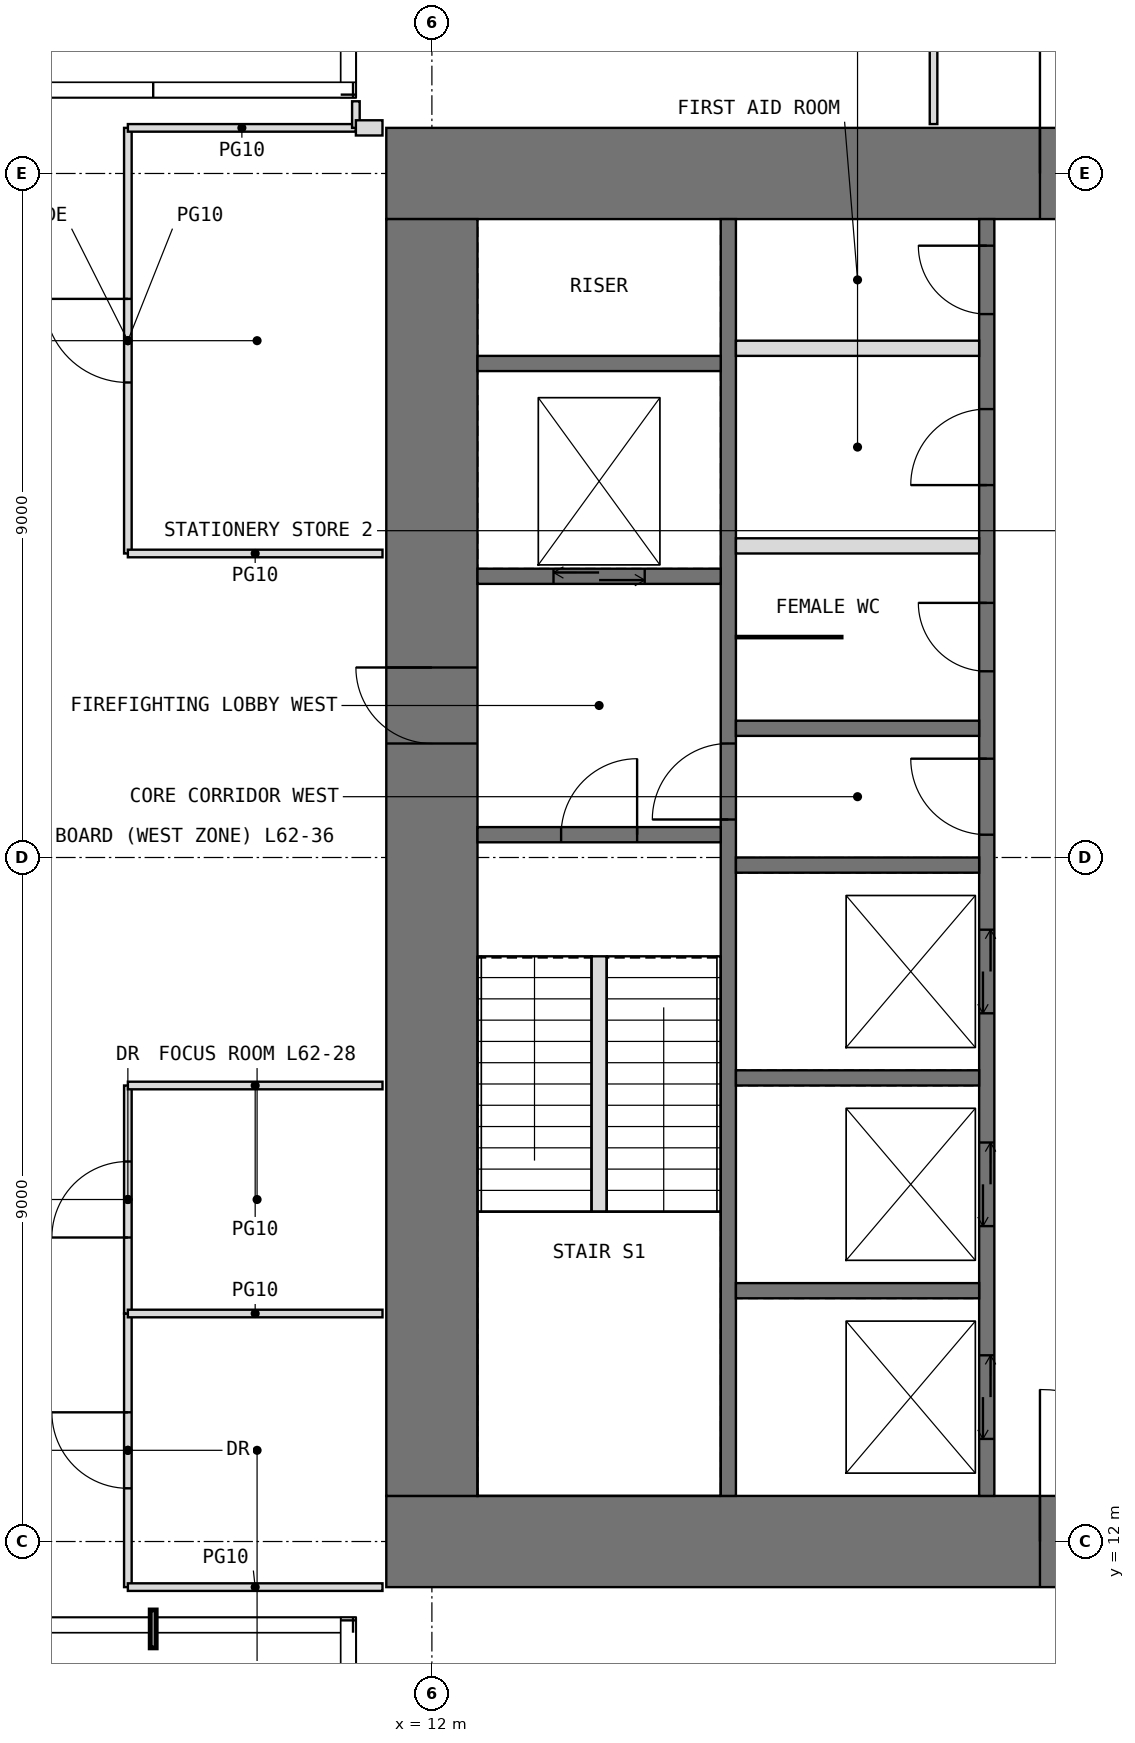
"""IFC4 building model, lengths in metres.
Left out: names, types, materials, properties, quantities, classifications, styles, units other than length and angle.
Written with IfcOpenShell. Run it as: python <this file> out.ifc"""

import sys

from ifc_helpers import new_model, si_unit, direction, frame, frame_2d, origin, place, context, subcontext, project, spatial, rectangle, extrude, element, fill, save


model = new_model("IFC4")
c1 = context("Model", 3, precision=1e-05, world=origin(), true_north=direction((0.0, 1.0)))
c2 = subcontext(c1, "Body", "Model", "MODEL_VIEW")
j1 = project(units=[si_unit("LENGTHUNIT", "METRE"), si_unit("PLANEANGLEUNIT", "RADIAN")], contexts=[c1])
p1 = place(None, origin())
s1 = spatial("IfcSite", under=j1, at=p1, CompositionType="ELEMENT")
p2 = place(p1, origin())
s2 = spatial("IfcBuilding", under=s1, at=p2, CompositionType="ELEMENT")
p3 = place(p2, frame((0.0, 0.0, 260.8)))
s3 = spatial("IfcBuildingStorey", under=s2, at=p3, CompositionType="ELEMENT", Elevation=260.8)
p4 = place(p3, frame((11.4, 12.0, -0.05), z_axis=(0.0, 0.0, 1.0), x_axis=(1.0, 0.0, 0.0)))
e1 = element("IfcWall", 1, at=p4, inside=s3, PredefinedType="SHEAR", context=c2, shape_type="SweptSolid", body=[
    extrude(rectangle(XDim=19.2, YDim=1.2, at=frame_2d((9.6, 0.0))), origin(), (0.0, 0.0, 1.0), 4.2),
])
p5 = place(p4, frame((8.6, 0.0, 0.05)))
e2 = element("IfcOpeningElement", 2, at=p5, cuts=e1, PredefinedType="OPENING", context=c2, shape_type="SweptSolid", body=[
    extrude(rectangle(XDim=2.0, YDim=2.2, at=frame_2d((1.0, 1.1))), frame((0.0, 0.61, 0.0), z_axis=(0.0, -1.0, 0.0), x_axis=(1.0, 0.0, 0.0)), (0.0, 0.0, 1.0), 1.22),
])
p6 = place(p3, frame((11.4, 30.0, -0.05), z_axis=(0.0, 0.0, 1.0), x_axis=(1.0, 0.0, 0.0)))
e3 = element("IfcWall", 3, at=p6, inside=s3, PredefinedType="SHEAR", context=c2, shape_type="SweptSolid", body=[
    extrude(rectangle(XDim=19.2, YDim=1.2, at=frame_2d((9.6, 0.0))), origin(), (0.0, 0.0, 1.0), 4.2),
])
p7 = place(p6, frame((8.6, 0.0, 0.05)))
e4 = element("IfcOpeningElement", 4, at=p7, cuts=e3, PredefinedType="OPENING", context=c2, shape_type="SweptSolid", body=[
    extrude(rectangle(XDim=2.0, YDim=2.2, at=frame_2d((1.0, 1.1))), frame((0.0, 0.61, 0.0), z_axis=(0.0, -1.0, 0.0), x_axis=(1.0, 0.0, 0.0)), (0.0, 0.0, 1.0), 1.22),
])
p8 = place(p3, frame((12.0, 12.6, -0.05), z_axis=(0.0, 0.0, 1.0), x_axis=(0.0, 1.0, 0.0)))
e5 = element("IfcWall", 5, at=p8, inside=s3, PredefinedType="SHEAR", context=c2, shape_type="SweptSolid", body=[
    extrude(rectangle(XDim=16.8, YDim=1.2, at=frame_2d((8.4, 0.0))), origin(), (0.0, 0.0, 1.0), 4.2),
])
p9 = place(p8, frame((9.9, 0.0, 0.05)))
e6 = element("IfcOpeningElement", 6, at=p9, cuts=e5, PredefinedType="OPENING", context=c2, shape_type="SweptSolid", body=[
    extrude(rectangle(XDim=1.0, YDim=2.2, at=frame_2d((0.5, 1.1))), frame((0.0, 0.61, 0.0), z_axis=(0.0, -1.0, 0.0), x_axis=(1.0, 0.0, 0.0)), (0.0, 0.0, 1.0), 1.22),
])
p10 = place(p3, frame((15.9, 12.6, -0.05), z_axis=(0.0, 0.0, 1.0), x_axis=(0.0, 1.0, 0.0)))
e7 = element("IfcWall", 7, at=p10, inside=s3, PredefinedType="SHEAR", context=c2, shape_type="SweptSolid", body=[
    extrude(rectangle(XDim=16.8, YDim=0.2, at=frame_2d((8.4, 0.0))), origin(), (0.0, 0.0, 1.0), 4.2),
])
p11 = place(p10, frame((8.9, 0.0, 0.05)))
e8 = element("IfcOpeningElement", 8, at=p11, cuts=e7, PredefinedType="OPENING", context=c2, shape_type="SweptSolid", body=[
    extrude(rectangle(XDim=1.0, YDim=2.2, at=frame_2d((0.5, 1.1))), frame((0.0, 0.11, 0.0), z_axis=(0.0, -1.0, 0.0), x_axis=(1.0, 0.0, 0.0)), (0.0, 0.0, 1.0), 0.22),
])
p12 = place(p3, frame((19.3, 12.6, -0.05), z_axis=(0.0, 0.0, 1.0), x_axis=(0.0, 1.0, 0.0)))
e9 = element("IfcWall", 9, at=p12, inside=s3, PredefinedType="SHEAR", context=c2, shape_type="SweptSolid", body=[
    extrude(rectangle(XDim=16.8, YDim=0.2, at=frame_2d((8.4, 0.0))), origin(), (0.0, 0.0, 1.0), 4.2),
])
p13 = place(p12, frame((8.7, 0.0, 0.05)))
e10 = element("IfcOpeningElement", 10, at=p13, cuts=e9, PredefinedType="OPENING", context=c2, shape_type="SweptSolid", body=[
    extrude(rectangle(XDim=1.0, YDim=2.2, at=frame_2d((0.5, 1.1))), frame((0.0, 0.11, 0.0), z_axis=(0.0, -1.0, 0.0), x_axis=(1.0, 0.0, 0.0)), (0.0, 0.0, 1.0), 0.22),
])
p14 = place(p12, frame((10.85, 0.0, 0.05)))
e11 = element("IfcOpeningElement", 11, at=p14, cuts=e9, PredefinedType="OPENING", context=c2, shape_type="SweptSolid", body=[
    extrude(rectangle(XDim=0.9, YDim=2.2, at=frame_2d((0.45, 1.1))), frame((0.0, 0.11, 0.0), z_axis=(0.0, -1.0, 0.0), x_axis=(1.0, 0.0, 0.0)), (0.0, 0.0, 1.0), 0.22),
])
p15 = place(p12, frame((13.3, 0.0, 0.05)))
e12 = element("IfcOpeningElement", 12, at=p15, cuts=e9, PredefinedType="OPENING", context=c2, shape_type="SweptSolid", body=[
    extrude(rectangle(XDim=1.0, YDim=2.2, at=frame_2d((0.5, 1.1))), frame((0.0, 0.11, 0.0), z_axis=(0.0, -1.0, 0.0), x_axis=(1.0, 0.0, 0.0)), (0.0, 0.0, 1.0), 0.22),
])
p16 = place(p12, frame((15.55, 0.0, 0.05)))
e13 = element("IfcOpeningElement", 13, at=p16, cuts=e9, PredefinedType="OPENING", context=c2, shape_type="SweptSolid", body=[
    extrude(rectangle(XDim=0.9, YDim=2.2, at=frame_2d((0.45, 1.1))), frame((0.0, 0.11, 0.0), z_axis=(0.0, -1.0, 0.0), x_axis=(1.0, 0.0, 0.0)), (0.0, 0.0, 1.0), 0.22),
])
p17 = place(p12, frame((0.75, 0.0, 0.05)))
e14 = element("IfcOpeningElement", 14, at=p17, cuts=e9, PredefinedType="OPENING", context=c2, shape_type="SweptSolid", body=[
    extrude(rectangle(XDim=1.1, YDim=2.2, at=frame_2d((0.55, 1.1))), frame((0.0, 0.11, 0.0), z_axis=(0.0, -1.0, 0.0), x_axis=(1.0, 0.0, 0.0)), (0.0, 0.0, 1.0), 0.22),
])
p18 = place(p12, frame((3.55, 0.0, 0.05)))
e15 = element("IfcOpeningElement", 15, at=p18, cuts=e9, PredefinedType="OPENING", context=c2, shape_type="SweptSolid", body=[
    extrude(rectangle(XDim=1.1, YDim=2.2, at=frame_2d((0.55, 1.1))), frame((0.0, 0.11, 0.0), z_axis=(0.0, -1.0, 0.0), x_axis=(1.0, 0.0, 0.0)), (0.0, 0.0, 1.0), 0.22),
])
p19 = place(p12, frame((6.35, 0.0, 0.05)))
e16 = element("IfcOpeningElement", 16, at=p19, cuts=e9, PredefinedType="OPENING", context=c2, shape_type="SweptSolid", body=[
    extrude(rectangle(XDim=1.1, YDim=2.2, at=frame_2d((0.55, 1.1))), frame((0.0, 0.11, 0.0), z_axis=(0.0, -1.0, 0.0), x_axis=(1.0, 0.0, 0.0)), (0.0, 0.0, 1.0), 0.22),
])
p20 = place(p3, frame((12.6, 21.3, -0.05), z_axis=(0.0, 0.0, 1.0), x_axis=(1.0, 0.0, 0.0)))
e17 = element("IfcWall", 17, at=p20, inside=s3, PredefinedType="SHEAR", context=c2, shape_type="SweptSolid", body=[
    extrude(rectangle(XDim=3.2, YDim=0.2, at=frame_2d((1.6, 0.0))), origin(), (0.0, 0.0, 1.0), 4.2),
])
p21 = place(p20, frame((1.1, 0.0, 0.05)))
e18 = element("IfcOpeningElement", 18, at=p21, cuts=e17, PredefinedType="OPENING", context=c2, shape_type="SweptSolid", body=[
    extrude(rectangle(XDim=1.0, YDim=2.2, at=frame_2d((0.5, 1.1))), frame((0.0, 0.11, 0.0), z_axis=(0.0, -1.0, 0.0), x_axis=(1.0, 0.0, 0.0)), (0.0, 0.0, 1.0), 0.22),
])
p22 = place(p3, frame((12.6, 24.7, -0.05), z_axis=(0.0, 0.0, 1.0), x_axis=(1.0, 0.0, 0.0)))
e19 = element("IfcWall", 19, at=p22, inside=s3, PredefinedType="SHEAR", context=c2, shape_type="SweptSolid", body=[
    extrude(rectangle(XDim=3.2, YDim=0.2, at=frame_2d((1.6, 0.0))), origin(), (0.0, 0.0, 1.0), 4.2),
])
p23 = place(p22, frame((1.0, 0.0, 0.05)))
e20 = element("IfcOpeningElement", 20, at=p23, cuts=e19, PredefinedType="OPENING", context=c2, shape_type="SweptSolid", body=[
    extrude(rectangle(XDim=1.2, YDim=2.2, at=frame_2d((0.6, 1.1))), frame((0.0, 0.11, 0.0), z_axis=(0.0, -1.0, 0.0), x_axis=(1.0, 0.0, 0.0)), (0.0, 0.0, 1.0), 0.22),
])
for number, where, z_axis, x_axis in (
    (21, (12.6, 27.5, -0.05), (0.0, 0.0, 1.0), (1.0, 0.0, 0.0)),
    (22, (16.0, 15.3, -0.05), (0.0, 0.0, 1.0), (1.0, 0.0, 0.0)),
    (23, (16.0, 18.1, -0.05), (0.0, 0.0, 1.0), (1.0, 0.0, 0.0)),
    (24, (16.0, 20.9, -0.05), (0.0, 0.0, 1.0), (1.0, 0.0, 0.0)),
    (25, (16.0, 22.7, -0.05), (0.0, 0.0, 1.0), (1.0, 0.0, 0.0)),
):
    element("IfcWall", number, at=place(p3, frame(where, z_axis=z_axis, x_axis=x_axis)), inside=s3, PredefinedType="SHEAR", context=c2, shape_type="SweptSolid", body=[
        extrude(rectangle(XDim=3.2, YDim=0.2, at=frame_2d((1.6, 0.0))), origin(), (0.0, 0.0, 1.0), 4.2),
    ])
for number, where, z_axis, x_axis in (
    (26, (16.0, 25.1, 0.0), (0.0, 0.0, 1.0), (1.0, 0.0, 0.0)),
    (27, (16.0, 27.7, 0.0), (0.0, 0.0, 1.0), (1.0, 0.0, 0.0)),
):
    element("IfcWall", number, at=place(p3, frame(where, z_axis=z_axis, x_axis=x_axis)), inside=s3, PredefinedType="PARTITIONING", context=c2, shape_type="SweptSolid", body=[
        extrude(rectangle(XDim=3.2, YDim=0.2, at=frame_2d((1.6, 0.0))), origin(), (0.0, 0.0, 1.0), 3.95),
    ])
p24 = place(p3, frame((16.0, 23.9, 0.0), z_axis=(0.0, 0.0, 1.0), x_axis=(1.0, 0.0, 0.0)))
e28 = element("IfcWall", 28, at=p24, inside=s3, PredefinedType="PARTITIONING", context=c2, shape_type="SweptSolid", body=[
    extrude(rectangle(XDim=1.4, YDim=0.03, at=frame_2d((0.7, 0.0))), origin(), (0.0, 0.0, 1.0), 3.95),
])
p25 = place(p3, frame((8.0, 11.4, 0.0), z_axis=(0.0, 0.0, 1.0), x_axis=(0.0, 1.0, 0.0)))
e29 = element("IfcWall", 29, at=p25, inside=s3, PredefinedType="PARTITIONING", context=c2, shape_type="SweptSolid", body=[
    extrude(rectangle(XDim=3.6, YDim=0.1, at=frame_2d((1.8, 0.0))), origin(), (0.0, 0.0, 1.0), 3.95),
])
p26 = place(p25, frame((1.3, 0.0, 0.0)))
e30 = element("IfcOpeningElement", 30, at=p26, cuts=e29, PredefinedType="OPENING", context=c2, shape_type="SweptSolid", body=[
    extrude(rectangle(XDim=1.0, YDim=2.2, at=frame_2d((0.5, 1.1))), frame((0.0, 0.06, 0.0), z_axis=(0.0, -1.0, 0.0), x_axis=(1.0, 0.0, 0.0)), (0.0, 0.0, 1.0), 0.12),
])
p27 = place(p3, frame((8.0, 11.4, 0.0), z_axis=(0.0, 0.0, 1.0), x_axis=(1.0, 0.0, 0.0)))
e31 = element("IfcWall", 31, at=p27, inside=s3, PredefinedType="PARTITIONING", context=c2, shape_type="SweptSolid", body=[
    extrude(rectangle(XDim=3.35, YDim=0.1, at=frame_2d((1.675, 0.0))), origin(), (0.0, 0.0, 1.0), 3.95),
])
p28 = place(p3, frame((8.0, 15.0, 0.0), z_axis=(0.0, 0.0, 1.0), x_axis=(0.0, 1.0, 0.0)))
e32 = element("IfcWall", 32, at=p28, inside=s3, PredefinedType="PARTITIONING", context=c2, shape_type="SweptSolid", body=[
    extrude(rectangle(XDim=3.0, YDim=0.1, at=frame_2d((1.5, 0.0))), origin(), (0.0, 0.0, 1.0), 3.95),
])
p29 = place(p28, frame((1.0, 0.0, 0.0)))
e33 = element("IfcOpeningElement", 33, at=p29, cuts=e32, PredefinedType="OPENING", context=c2, shape_type="SweptSolid", body=[
    extrude(rectangle(XDim=1.0, YDim=2.2, at=frame_2d((0.5, 1.1))), frame((0.0, 0.06, 0.0), z_axis=(0.0, -1.0, 0.0), x_axis=(1.0, 0.0, 0.0)), (0.0, 0.0, 1.0), 0.12),
])
for number, where, z_axis, x_axis in (
    (34, (8.0, 15.0, 0.0), (0.0, 0.0, 1.0), (1.0, 0.0, 0.0)),
    (35, (8.0, 18.0, 0.0), (0.0, 0.0, 1.0), (1.0, 0.0, 0.0)),
):
    element("IfcWall", number, at=place(p3, frame(where, z_axis=z_axis, x_axis=x_axis)), inside=s3, PredefinedType="PARTITIONING", context=c2, shape_type="SweptSolid", body=[
        extrude(rectangle(XDim=3.35, YDim=0.1, at=frame_2d((1.675, 0.0))), origin(), (0.0, 0.0, 1.0), 3.95),
    ])
p30 = place(p3, frame((8.0, 25.0, 0.0), z_axis=(0.0, 0.0, 1.0), x_axis=(0.0, 1.0, 0.0)))
e36 = element("IfcWall", 36, at=p30, inside=s3, PredefinedType="PARTITIONING", context=c2, shape_type="SweptSolid", body=[
    extrude(rectangle(XDim=5.6, YDim=0.1, at=frame_2d((2.8, 0.0))), origin(), (0.0, 0.0, 1.0), 3.95),
])
p31 = place(p30, frame((2.25, 0.0, 0.0)))
e37 = element("IfcOpeningElement", 37, at=p31, cuts=e36, PredefinedType="OPENING", context=c2, shape_type="SweptSolid", body=[
    extrude(rectangle(XDim=1.1, YDim=2.3, at=frame_2d((0.55, 1.15))), frame((0.0, 0.06, 0.0), z_axis=(0.0, -1.0, 0.0), x_axis=(1.0, 0.0, 0.0)), (0.0, 0.0, 1.0), 0.12),
])
p32 = place(p3, frame((8.0, 25.0, 0.0), z_axis=(0.0, 0.0, 1.0), x_axis=(1.0, 0.0, 0.0)))
e38 = element("IfcWall", 38, at=p32, inside=s3, PredefinedType="PARTITIONING", context=c2, shape_type="SweptSolid", body=[
    extrude(rectangle(XDim=3.35, YDim=0.1, at=frame_2d((1.675, 0.0))), origin(), (0.0, 0.0, 1.0), 3.95),
])
p33 = place(p3, frame((8.0, 30.6, 0.0), z_axis=(0.0, 0.0, 1.0), x_axis=(1.0, 0.0, 0.0)))
e39 = element("IfcWall", 39, at=p33, inside=s3, PredefinedType="PARTITIONING", context=c2, shape_type="SweptSolid", body=[
    extrude(rectangle(XDim=3.0, YDim=0.1, at=frame_2d((1.5, 0.0))), origin(), (0.0, 0.0, 1.0), 3.95),
])
p34 = place(p3, frame((11.0, 30.6, 0.0), z_axis=(0.0, 0.0, 1.0), x_axis=(0.0, 1.0, 0.0)))
e40 = element("IfcWall", 40, at=p34, inside=s3, PredefinedType="PARTITIONING", context=c2, shape_type="SweptSolid", body=[
    extrude(rectangle(XDim=0.35, YDim=0.1, at=frame_2d((0.175, 0.0))), origin(), (0.0, 0.0, 1.0), 3.95),
])
p35 = place(p3, frame((11.0, 30.6, 0.0), z_axis=(0.0, 0.0, 1.0), x_axis=(1.0, 0.0, 0.0)))
e41 = element("IfcWall", 41, at=p35, inside=s3, PredefinedType="PARTITIONING", context=c2, shape_type="SweptSolid", body=[
    extrude(rectangle(XDim=0.35, YDim=0.2, at=frame_2d((0.175, 0.0))), origin(), (0.0, 0.0, 1.0), 3.95),
])
p36 = place(p3, frame((18.6, 30.65, 0.0), z_axis=(0.0, 0.0, 1.0), x_axis=(0.0, 1.0, 0.0)))
e42 = element("IfcWall", 42, at=p36, inside=s3, PredefinedType="PARTITIONING", context=c2, shape_type="SweptSolid", body=[
    extrude(rectangle(XDim=4.15, YDim=0.1, at=frame_2d((2.075, 0.0))), origin(), (0.0, 0.0, 1.0), 3.95),
])
p37 = place(p3, frame((14.2, 16.34, 0.0), z_axis=(0.0, 0.0, 1.0), x_axis=(0.0, 1.0, 0.0)))
e43 = element("IfcWall", 43, at=p37, inside=s3, PredefinedType="PARTITIONING", context=c2, shape_type="SweptSolid", body=[
    extrude(rectangle(XDim=3.36, YDim=0.2, at=frame_2d((1.68, 0.0))), origin(), (0.0, 0.0, 1.0), 4.2),
])
p38 = place(p5, origin())
e44 = element("IfcDoor", 44, at=p38, inside=s3, OperationType="DOUBLE_DOOR_SINGLE_SWING", PredefinedType="DOOR", context=c2, shape_type="SweptSolid", body=[
    extrude(rectangle(XDim=2.0, YDim=2.2, at=frame_2d((1.0, 1.1))), frame((0.0, 0.025, 0.0), z_axis=(0.0, -1.0, 0.0), x_axis=(1.0, 0.0, 0.0)), (0.0, 0.0, 1.0), 0.05),
])
fill(e2, e44)
p39 = place(p7, origin())
e45 = element("IfcDoor", 45, at=p39, inside=s3, OperationType="DOUBLE_DOOR_SINGLE_SWING", PredefinedType="DOOR", context=c2, shape_type="SweptSolid", body=[
    extrude(rectangle(XDim=2.0, YDim=2.2, at=frame_2d((1.0, 1.1))), frame((0.0, 0.025, 0.0), z_axis=(0.0, -1.0, 0.0), x_axis=(1.0, 0.0, 0.0)), (0.0, 0.0, 1.0), 0.05),
])
fill(e4, e45)
p40 = place(p9, origin())
e46 = element("IfcDoor", 46, at=p40, inside=s3, OperationType="SINGLE_SWING_RIGHT", PredefinedType="DOOR", context=c2, shape_type="SweptSolid", body=[
    extrude(rectangle(XDim=1.0, YDim=2.2, at=frame_2d((0.5, 1.1))), frame((0.0, 0.025, 0.0), z_axis=(0.0, -1.0, 0.0), x_axis=(1.0, 0.0, 0.0)), (0.0, 0.0, 1.0), 0.05),
])
fill(e6, e46)
p41 = place(p21, origin())
e47 = element("IfcDoor", 47, at=p41, inside=s3, OperationType="SINGLE_SWING_RIGHT", PredefinedType="DOOR", context=c2, shape_type="SweptSolid", body=[
    extrude(rectangle(XDim=1.0, YDim=2.2, at=frame_2d((0.5, 1.1))), frame((0.0, 0.025, 0.0), z_axis=(0.0, -1.0, 0.0), x_axis=(1.0, 0.0, 0.0)), (0.0, 0.0, 1.0), 0.05),
])
fill(e18, e47)
p42 = place(p11, origin())
e48 = element("IfcDoor", 48, at=p42, inside=s3, OperationType="SINGLE_SWING_LEFT", PredefinedType="DOOR", context=c2, shape_type="SweptSolid", body=[
    extrude(rectangle(XDim=1.0, YDim=2.2, at=frame_2d((0.5, 1.1))), frame((0.0, 0.025, 0.0), z_axis=(0.0, -1.0, 0.0), x_axis=(1.0, 0.0, 0.0)), (0.0, 0.0, 1.0), 0.05),
])
fill(e8, e48)
p43 = place(p13, origin())
e49 = element("IfcDoor", 49, at=p43, inside=s3, OperationType="SINGLE_SWING_RIGHT", PredefinedType="DOOR", context=c2, shape_type="SweptSolid", body=[
    extrude(rectangle(XDim=1.0, YDim=2.2, at=frame_2d((0.5, 1.1))), frame((0.0, 0.025, 0.0), z_axis=(0.0, -1.0, 0.0), x_axis=(1.0, 0.0, 0.0)), (0.0, 0.0, 1.0), 0.05),
])
fill(e10, e49)
p44 = place(p14, origin())
e50 = element("IfcDoor", 50, at=p44, inside=s3, OperationType="SINGLE_SWING_RIGHT", PredefinedType="DOOR", context=c2, shape_type="SweptSolid", body=[
    extrude(rectangle(XDim=0.9, YDim=2.2, at=frame_2d((0.45, 1.1))), frame((0.0, 0.025, 0.0), z_axis=(0.0, -1.0, 0.0), x_axis=(1.0, 0.0, 0.0)), (0.0, 0.0, 1.0), 0.05),
])
fill(e11, e50)
p45 = place(p15, origin())
e51 = element("IfcDoor", 51, at=p45, inside=s3, OperationType="SINGLE_SWING_LEFT", PredefinedType="DOOR", context=c2, shape_type="SweptSolid", body=[
    extrude(rectangle(XDim=1.0, YDim=2.2, at=frame_2d((0.5, 1.1))), frame((0.0, 0.025, 0.0), z_axis=(0.0, -1.0, 0.0), x_axis=(1.0, 0.0, 0.0)), (0.0, 0.0, 1.0), 0.05),
])
fill(e12, e51)
p46 = place(p16, origin())
e52 = element("IfcDoor", 52, at=p46, inside=s3, OperationType="SINGLE_SWING_RIGHT", PredefinedType="DOOR", context=c2, shape_type="SweptSolid", body=[
    extrude(rectangle(XDim=0.9, YDim=2.2, at=frame_2d((0.45, 1.1))), frame((0.0, 0.025, 0.0), z_axis=(0.0, -1.0, 0.0), x_axis=(1.0, 0.0, 0.0)), (0.0, 0.0, 1.0), 0.05),
])
fill(e13, e52)
p47 = place(p26, origin())
e53 = element("IfcDoor", 53, at=p47, inside=s3, OperationType="SINGLE_SWING_RIGHT", PredefinedType="DOOR", context=c2, shape_type="SweptSolid", body=[
    extrude(rectangle(XDim=1.0, YDim=2.2, at=frame_2d((0.5, 1.1))), frame((0.0, 0.025, 0.0), z_axis=(0.0, -1.0, 0.0), x_axis=(1.0, 0.0, 0.0)), (0.0, 0.0, 1.0), 0.05),
])
fill(e30, e53)
p48 = place(p29, origin())
e54 = element("IfcDoor", 54, at=p48, inside=s3, OperationType="SINGLE_SWING_LEFT", PredefinedType="DOOR", context=c2, shape_type="SweptSolid", body=[
    extrude(rectangle(XDim=1.0, YDim=2.2, at=frame_2d((0.5, 1.1))), frame((0.0, 0.025, 0.0), z_axis=(0.0, -1.0, 0.0), x_axis=(1.0, 0.0, 0.0)), (0.0, 0.0, 1.0), 0.05),
])
fill(e33, e54)
p49 = place(p31, origin())
e55 = element("IfcDoor", 55, at=p49, inside=s3, OperationType="SINGLE_SWING_RIGHT", PredefinedType="DOOR", context=c2, shape_type="SweptSolid", body=[
    extrude(rectangle(XDim=1.1, YDim=2.3, at=frame_2d((0.55, 1.15))), frame((0.0, 0.025, 0.0), z_axis=(0.0, -1.0, 0.0), x_axis=(1.0, 0.0, 0.0)), (0.0, 0.0, 1.0), 0.05),
])
fill(e37, e55)
p50 = place(p17, origin())
e56 = element("IfcDoor", 56, at=p50, inside=s3, OperationType="DOUBLE_DOOR_SLIDING", PredefinedType="DOOR", context=c2, shape_type="SweptSolid", body=[
    extrude(rectangle(XDim=1.1, YDim=2.2, at=frame_2d((0.55, 1.1))), frame((0.0, 0.025, 0.0), z_axis=(0.0, -1.0, 0.0), x_axis=(1.0, 0.0, 0.0)), (0.0, 0.0, 1.0), 0.05),
])
fill(e14, e56)
p51 = place(p18, origin())
e57 = element("IfcDoor", 57, at=p51, inside=s3, OperationType="DOUBLE_DOOR_SLIDING", PredefinedType="DOOR", context=c2, shape_type="SweptSolid", body=[
    extrude(rectangle(XDim=1.1, YDim=2.2, at=frame_2d((0.55, 1.1))), frame((0.0, 0.025, 0.0), z_axis=(0.0, -1.0, 0.0), x_axis=(1.0, 0.0, 0.0)), (0.0, 0.0, 1.0), 0.05),
])
fill(e15, e57)
p52 = place(p19, origin())
e58 = element("IfcDoor", 58, at=p52, inside=s3, OperationType="DOUBLE_DOOR_SLIDING", PredefinedType="DOOR", context=c2, shape_type="SweptSolid", body=[
    extrude(rectangle(XDim=1.1, YDim=2.2, at=frame_2d((0.55, 1.1))), frame((0.0, 0.025, 0.0), z_axis=(0.0, -1.0, 0.0), x_axis=(1.0, 0.0, 0.0)), (0.0, 0.0, 1.0), 0.05),
])
fill(e16, e58)
p53 = place(p23, origin())
e59 = element("IfcDoor", 59, at=p53, inside=s3, OperationType="DOUBLE_DOOR_SLIDING", PredefinedType="DOOR", context=c2, shape_type="SweptSolid", body=[
    extrude(rectangle(XDim=1.2, YDim=2.2, at=frame_2d((0.6, 1.1))), frame((0.0, 0.025, 0.0), z_axis=(0.0, -1.0, 0.0), x_axis=(1.0, 0.0, 0.0)), (0.0, 0.0, 1.0), 0.05),
])
fill(e20, e59)
save(model, sys.argv[1])
